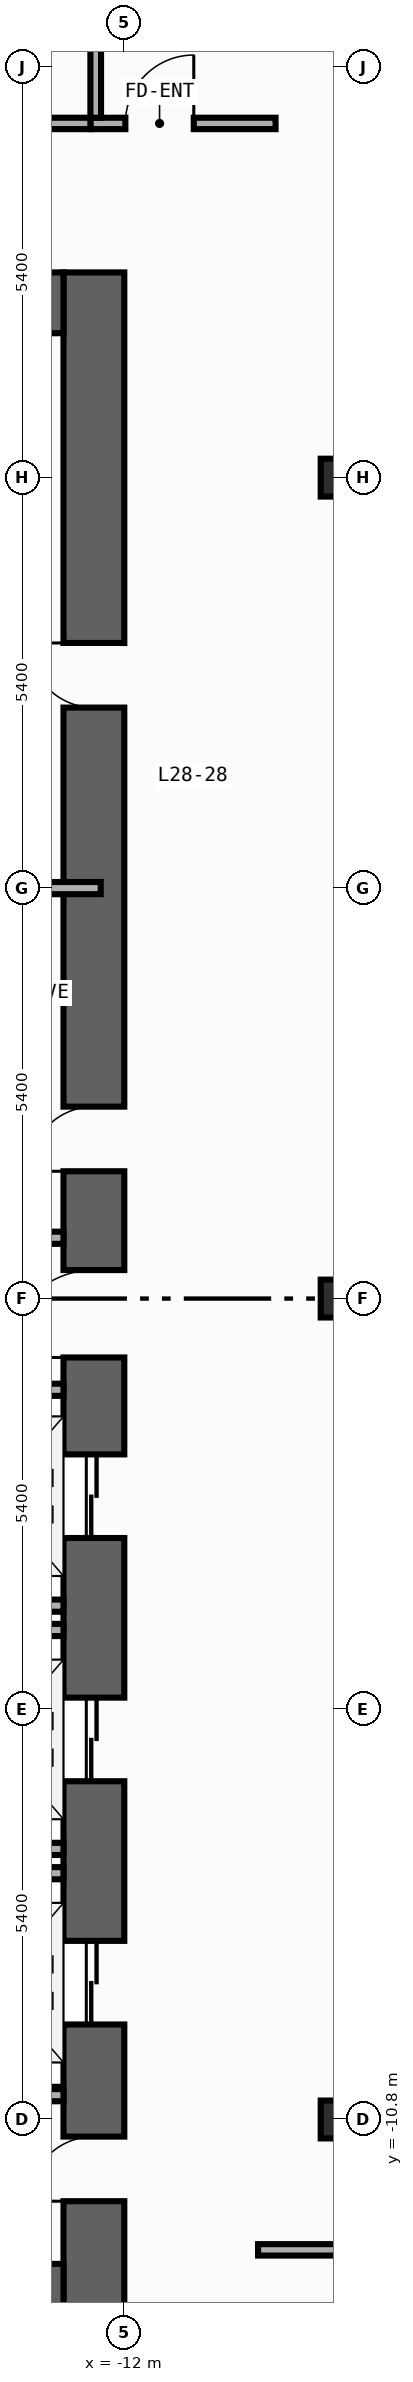
"""IFC4 building model, lengths in metres.
Left out: names, types, materials, properties, quantities, classifications, styles, units other than length and angle.
Written with IfcOpenShell. Run it as: python <this file> out.ifc"""

import sys

from ifc_helpers import new_model, si_unit, direction, frame, frame_2d, origin, origin_2d, place, context, subcontext, project, spatial, rectangle, i_section, extrude, element, fill, save


model = new_model("IFC4")
c1 = context("Model", 3, precision=1e-05, world=origin(), true_north=direction((0.0, 1.0)))
c2 = subcontext(c1, "Body", "Model", "MODEL_VIEW")
j1 = project(units=[si_unit("LENGTHUNIT", "METRE"), si_unit("PLANEANGLEUNIT", "RADIAN")], contexts=[c1])
p1 = place(None, origin())
s1 = spatial("IfcSite", under=j1, at=p1, CompositionType="ELEMENT")
p2 = place(p1, origin())
s2 = spatial("IfcBuilding", under=s1, at=p2, CompositionType="ELEMENT")
p3 = place(p2, frame((0.0, 0.0, 122.6)))
s3 = spatial("IfcBuildingStorey", under=s2, at=p3, CompositionType="ELEMENT", Elevation=122.6)
p4 = place(p3, frame((-12.4, -13.5, 0.0), z_axis=(0.0, 0.0, 1.0), x_axis=(0.0, 1.0, 0.0)))
e1 = element("IfcWall", 1, at=p4, inside=s3, PredefinedType="SHEAR", context=c2, shape_type="SweptSolid", body=[
    extrude(rectangle(XDim=27.0, YDim=0.8, at=frame_2d((13.5, 0.0))), origin(), (0.0, 0.0, 1.0), 3.94),
])
p5 = place(p4, frame((10.35, 0.0, 0.0)))
e2 = element("IfcOpeningElement", 2, at=p5, cuts=e1, PredefinedType="OPENING", context=c2, shape_type="SweptSolid", body=[
    extrude(rectangle(XDim=1.1, YDim=2.2, at=frame_2d((0.55, 1.1))), frame((0.0, 0.41, 0.0), z_axis=(0.0, -1.0, 0.0), x_axis=(1.0, 0.0, 0.0)), (0.0, 0.0, 1.0), 0.82),
])
p6 = place(p4, frame((7.15, 0.0, 0.0)))
e3 = element("IfcOpeningElement", 3, at=p6, cuts=e1, PredefinedType="OPENING", context=c2, shape_type="SweptSolid", body=[
    extrude(rectangle(XDim=1.1, YDim=2.2, at=frame_2d((0.55, 1.1))), frame((0.0, 0.41, 0.0), z_axis=(0.0, -1.0, 0.0), x_axis=(1.0, 0.0, 0.0)), (0.0, 0.0, 1.0), 0.82),
])
p7 = place(p4, frame((3.95, 0.0, 0.0)))
e4 = element("IfcOpeningElement", 4, at=p7, cuts=e1, PredefinedType="OPENING", context=c2, shape_type="SweptSolid", body=[
    extrude(rectangle(XDim=1.1, YDim=2.2, at=frame_2d((0.55, 1.1))), frame((0.0, 0.41, 0.0), z_axis=(0.0, -1.0, 0.0), x_axis=(1.0, 0.0, 0.0)), (0.0, 0.0, 1.0), 0.82),
])
p8 = place(p4, frame((15.175, 0.0, 0.0)))
e5 = element("IfcOpeningElement", 5, at=p8, cuts=e1, PredefinedType="OPENING", context=c2, shape_type="SweptSolid", body=[
    extrude(rectangle(XDim=0.85, YDim=2.1, at=frame_2d((0.425, 1.05))), frame((0.0, 0.41, 0.0), z_axis=(0.0, -1.0, 0.0), x_axis=(1.0, 0.0, 0.0)), (0.0, 0.0, 1.0), 0.82),
])
p9 = place(p4, frame((21.275, 0.0, 0.0)))
e6 = element("IfcOpeningElement", 6, at=p9, cuts=e1, PredefinedType="OPENING", context=c2, shape_type="SweptSolid", body=[
    extrude(rectangle(XDim=0.85, YDim=2.1, at=frame_2d((0.425, 1.05))), frame((0.0, 0.41, 0.0), z_axis=(0.0, -1.0, 0.0), x_axis=(1.0, 0.0, 0.0)), (0.0, 0.0, 1.0), 0.82),
])
p10 = place(p4, frame((12.725, 0.0, 0.0)))
e7 = element("IfcOpeningElement", 7, at=p10, cuts=e1, PredefinedType="OPENING", context=c2, shape_type="SweptSolid", body=[
    extrude(rectangle(XDim=1.15, YDim=2.2, at=frame_2d((0.575, 1.1))), frame((0.0, 0.41, 0.0), z_axis=(0.0, -1.0, 0.0), x_axis=(1.0, 0.0, 0.0)), (0.0, 0.0, 1.0), 0.82),
])
p11 = place(p4, frame((1.625, 0.0, 0.0)))
e8 = element("IfcOpeningElement", 8, at=p11, cuts=e1, PredefinedType="OPENING", context=c2, shape_type="SweptSolid", body=[
    extrude(rectangle(XDim=0.85, YDim=2.1, at=frame_2d((0.425, 1.05))), frame((0.0, 0.41, 0.0), z_axis=(0.0, -1.0, 0.0), x_axis=(1.0, 0.0, 0.0)), (0.0, 0.0, 1.0), 0.82),
])
for number, where, z_axis, x_axis in (
    (9, (-19.6, -13.1, 0.0), (0.0, 0.0, 1.0), (1.0, 0.0, 0.0)),
    (10, (-19.6, 13.1, 0.0), (0.0, 0.0, 1.0), (1.0, 0.0, 0.0)),
):
    element("IfcWall", number, at=place(p3, frame(where, z_axis=z_axis, x_axis=x_axis)), inside=s3, PredefinedType="SHEAR", context=c2, shape_type="SweptSolid", body=[
        extrude(rectangle(XDim=6.8, YDim=0.8, at=frame_2d((3.4, 0.0))), origin(), (0.0, 0.0, 1.0), 3.94),
    ])
for number, where, z_axis, x_axis in (
    (11, (-9.2, -10.8, 0.0), (0.0, 0.0, 1.0), (1.0, 0.0, 0.0)),
    (12, (-9.2, 0.0, 0.0), (0.0, 0.0, 1.0), (1.0, 0.0, 0.0)),
    (13, (-9.2, 10.8, 0.0), (0.0, 0.0, 1.0), (1.0, 0.0, 0.0)),
):
    element("IfcColumn", number, at=place(p3, frame(where, z_axis=z_axis, x_axis=x_axis)), inside=s3, PredefinedType="COLUMN", context=c2, shape_type="SweptSolid", body=[
        extrude(i_section(OverallWidth=0.432, OverallDepth=0.498, WebThickness=0.045, FlangeThickness=0.07, FilletRadius=0.022, at=origin_2d()), origin(), (0.0, 0.0, 1.0), 4.2),
    ])
for number, where, z_axis, x_axis in (
    (14, (-14.99, -4.04, 0.0), (0.0, 0.0, 1.0), (1.0, 0.0, 0.0)),
    (15, (-14.99, -7.24, 0.0), (0.0, 0.0, 1.0), (1.0, 0.0, 0.0)),
    (16, (-14.99, -4.36, 0.0), (0.0, 0.0, 1.0), (1.0, 0.0, 0.0)),
    (17, (-14.99, -7.56, 0.0), (0.0, 0.0, 1.0), (1.0, 0.0, 0.0)),
):
    element("IfcWall", number, at=place(p3, frame(where, z_axis=z_axis, x_axis=x_axis)), inside=s3, PredefinedType="STANDARD", context=c2, shape_type="SweptSolid", body=[
        extrude(rectangle(XDim=2.19, YDim=0.16, at=frame_2d((1.095, 0.0))), origin(), (0.0, 0.0, 1.0), 3.94),
    ])
for number, where, z_axis, x_axis in (
    (18, (-15.4, 0.8, 0.0), (0.0, 0.0, 1.0), (1.0, 0.0, 0.0)),
    (19, (-15.4, -1.2, 0.0), (0.0, 0.0, 1.0), (1.0, 0.0, 0.0)),
    (20, (-15.4, -10.48, 0.0), (0.0, 0.0, 1.0), (1.0, 0.0, 0.0)),
):
    element("IfcWall", number, at=place(p3, frame(where, z_axis=z_axis, x_axis=x_axis)), inside=s3, PredefinedType="STANDARD", context=c2, shape_type="SweptSolid", body=[
        extrude(rectangle(XDim=2.6, YDim=0.16, at=frame_2d((1.3, 0.0))), origin(), (0.0, 0.0, 1.0), 3.94),
    ])
p12 = place(p3, frame((-15.375, 5.4, 0.0), z_axis=(0.0, 0.0, 1.0), x_axis=(1.0, 0.0, 0.0)))
e21 = element("IfcWall", 21, at=p12, inside=s3, PredefinedType="PARTITIONING", context=c2, shape_type="SweptSolid", body=[
    extrude(rectangle(XDim=3.065, YDim=0.16, at=frame_2d((1.532, 0.0))), origin(), (0.0, 0.0, 1.0), 3.94),
])
p13 = place(p3, frame((-12.446, 15.46, 0.0), z_axis=(0.0, 0.0, 1.0), x_axis=(1.0, 0.0, 0.0)))
e22 = element("IfcWall", 22, at=p13, inside=s3, PredefinedType="PARTITIONING", context=c2, shape_type="SweptSolid", body=[
    extrude(rectangle(XDim=2.436, YDim=0.15, at=frame_2d((1.218, 0.0))), origin(), (0.0, 0.0, 1.0), 3.94),
])
p14 = place(p13, frame((0.46, 0.0, 0.0)))
e23 = element("IfcOpeningElement", 23, at=p14, cuts=e22, PredefinedType="OPENING", context=c2, shape_type="SweptSolid", body=[
    extrude(rectangle(XDim=0.9, YDim=2.15, at=frame_2d((0.45, 1.075))), frame((0.0, 0.085, 0.0), z_axis=(0.0, -1.0, 0.0), x_axis=(1.0, 0.0, 0.0)), (0.0, 0.0, 1.0), 0.17),
])
p15 = place(p3, frame((-10.24, -12.515, 0.0), z_axis=(0.0, 0.0, 1.0), x_axis=(1.0, 0.0, 0.0)))
e24 = element("IfcWall", 24, at=p15, inside=s3, PredefinedType="PARTITIONING", context=c2, shape_type="SweptSolid", body=[
    extrude(rectangle(XDim=8.455, YDim=0.15, at=frame_2d((4.228, 0.0))), origin(), (0.0, 0.0, 1.0), 3.94),
])
p16 = place(p15, frame((7.095, 0.0, 0.0)))
e25 = element("IfcOpeningElement", 25, at=p16, cuts=e24, PredefinedType="OPENING", context=c2, shape_type="SweptSolid", body=[
    extrude(rectangle(XDim=0.9, YDim=2.15, at=frame_2d((0.45, 1.075))), frame((0.0, 0.085, 0.0), z_axis=(0.0, -1.0, 0.0), x_axis=(1.0, 0.0, 0.0)), (0.0, 0.0, 1.0), 0.17),
])
p17 = place(p3, frame((-20.64, 15.46, 0.0), z_axis=(0.0, 0.0, 1.0), x_axis=(1.0, 0.0, 0.0)))
e26 = element("IfcWall", 26, at=p17, inside=s3, PredefinedType="PARTITIONING", context=c2, shape_type="SweptSolid", body=[
    extrude(rectangle(XDim=8.194, YDim=0.15, at=frame_2d((4.097, 0.0))), origin(), (0.0, 0.0, 1.0), 3.94),
])
p18 = place(p17, frame((2.722, 0.0, 0.0)))
e27 = element("IfcOpeningElement", 27, at=p18, cuts=e26, PredefinedType="OPENING", context=c2, shape_type="SweptSolid", body=[
    extrude(rectangle(XDim=0.9, YDim=2.15, at=frame_2d((0.45, 1.075))), frame((0.0, 0.085, 0.0), z_axis=(0.0, -1.0, 0.0), x_axis=(1.0, 0.0, 0.0)), (0.0, 0.0, 1.0), 0.17),
])
p19 = place(p3, frame((-12.376, 15.535, 0.0), z_axis=(0.0, 0.0, 1.0), x_axis=(0.0, 1.0, 0.0)))
e28 = element("IfcWall", 28, at=p19, inside=s3, PredefinedType="PARTITIONING", context=c2, shape_type="SweptSolid", body=[
    extrude(rectangle(XDim=10.62, YDim=0.14, at=frame_2d((5.31, 0.0))), origin(), (0.0, 0.0, 1.0), 3.94),
])
p20 = place(p5, origin())
e29 = element("IfcDoor", 29, at=p20, inside=s3, OperationType="DOUBLE_DOOR_SLIDING", PredefinedType="DOOR", context=c2, shape_type="SweptSolid", body=[
    extrude(rectangle(XDim=1.1, YDim=2.2, at=frame_2d((0.55, 1.1))), frame((0.0, 0.025, 0.0), z_axis=(0.0, -1.0, 0.0), x_axis=(1.0, 0.0, 0.0)), (0.0, 0.0, 1.0), 0.05),
])
fill(e2, e29)
p21 = place(p6, origin())
e30 = element("IfcDoor", 30, at=p21, inside=s3, OperationType="DOUBLE_DOOR_SLIDING", PredefinedType="DOOR", context=c2, shape_type="SweptSolid", body=[
    extrude(rectangle(XDim=1.1, YDim=2.2, at=frame_2d((0.55, 1.1))), frame((0.0, 0.025, 0.0), z_axis=(0.0, -1.0, 0.0), x_axis=(1.0, 0.0, 0.0)), (0.0, 0.0, 1.0), 0.05),
])
fill(e3, e30)
p22 = place(p7, origin())
e31 = element("IfcDoor", 31, at=p22, inside=s3, OperationType="DOUBLE_DOOR_SLIDING", PredefinedType="DOOR", context=c2, shape_type="SweptSolid", body=[
    extrude(rectangle(XDim=1.1, YDim=2.2, at=frame_2d((0.55, 1.1))), frame((0.0, 0.025, 0.0), z_axis=(0.0, -1.0, 0.0), x_axis=(1.0, 0.0, 0.0)), (0.0, 0.0, 1.0), 0.05),
])
fill(e4, e31)
p23 = place(p8, origin())
e32 = element("IfcDoor", 32, at=p23, inside=s3, OperationType="SINGLE_SWING_LEFT", PredefinedType="DOOR", context=c2, shape_type="SweptSolid", body=[
    extrude(rectangle(XDim=0.85, YDim=2.1, at=frame_2d((0.425, 1.05))), frame((0.0, 0.025, 0.0), z_axis=(0.0, -1.0, 0.0), x_axis=(1.0, 0.0, 0.0)), (0.0, 0.0, 1.0), 0.05),
])
fill(e5, e32)
p24 = place(p9, origin())
e33 = element("IfcDoor", 33, at=p24, inside=s3, OperationType="SINGLE_SWING_RIGHT", PredefinedType="DOOR", context=c2, shape_type="SweptSolid", body=[
    extrude(rectangle(XDim=0.85, YDim=2.1, at=frame_2d((0.425, 1.05))), frame((0.0, 0.025, 0.0), z_axis=(0.0, -1.0, 0.0), x_axis=(1.0, 0.0, 0.0)), (0.0, 0.0, 1.0), 0.05),
])
fill(e6, e33)
p25 = place(p10, origin())
e34 = element("IfcDoor", 34, at=p25, inside=s3, OperationType="SINGLE_SWING_LEFT", PredefinedType="DOOR", context=c2, shape_type="SweptSolid", body=[
    extrude(rectangle(XDim=1.15, YDim=2.2, at=frame_2d((0.575, 1.1))), frame((0.0, 0.025, 0.0), z_axis=(0.0, -1.0, 0.0), x_axis=(1.0, 0.0, 0.0)), (0.0, 0.0, 1.0), 0.05),
])
fill(e7, e34)
p26 = place(p11, origin())
e35 = element("IfcDoor", 35, at=p26, inside=s3, OperationType="SINGLE_SWING_LEFT", PredefinedType="DOOR", context=c2, shape_type="SweptSolid", body=[
    extrude(rectangle(XDim=0.85, YDim=2.1, at=frame_2d((0.425, 1.05))), frame((0.0, 0.025, 0.0), z_axis=(0.0, -1.0, 0.0), x_axis=(1.0, 0.0, 0.0)), (0.0, 0.0, 1.0), 0.05),
])
fill(e8, e35)
p27 = place(p14, origin())
e36 = element("IfcDoor", 36, at=p27, inside=s3, OperationType="SINGLE_SWING_RIGHT", PredefinedType="DOOR", context=c2, shape_type="SweptSolid", body=[
    extrude(rectangle(XDim=0.9, YDim=2.15, at=frame_2d((0.45, 1.075))), frame((0.0, 0.025, 0.0), z_axis=(0.0, -1.0, 0.0), x_axis=(1.0, 0.0, 0.0)), (0.0, 0.0, 1.0), 0.05),
])
fill(e23, e36)
save(model, sys.argv[1])
